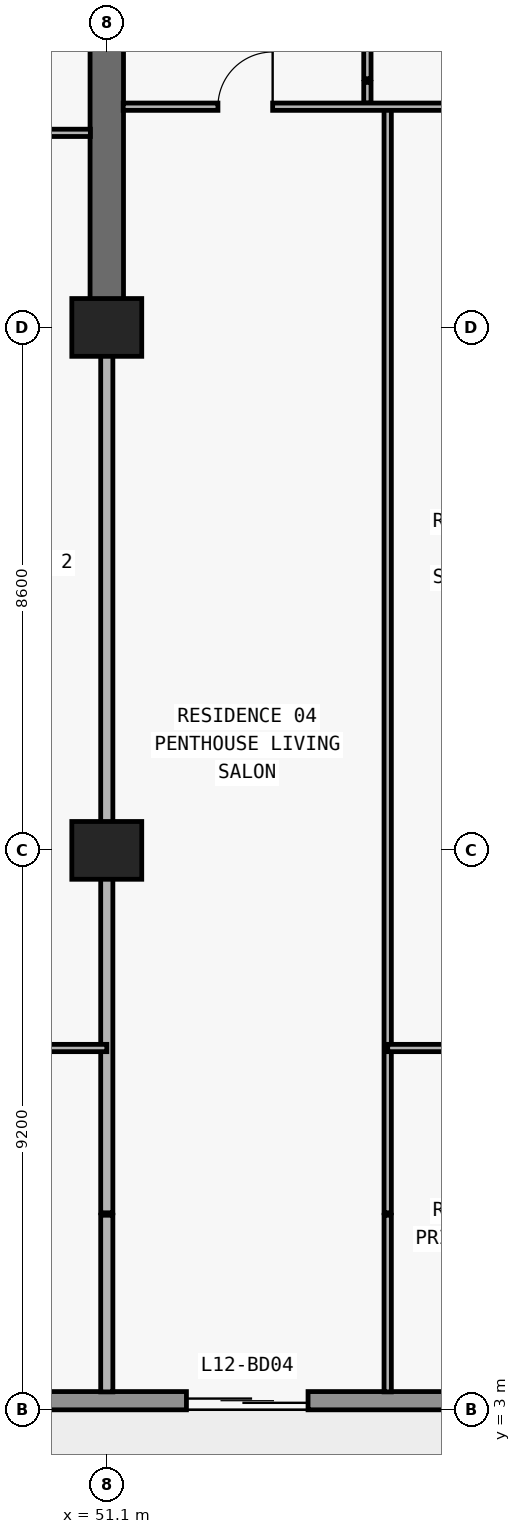
"""IFC4 building model, lengths in metres.
Left out: names, types, materials, properties, quantities, classifications, styles, units other than length and angle.
Written with IfcOpenShell. Run it as: python <this file> out.ifc"""

import sys

from ifc_helpers import new_model, si_unit, direction, frame, frame_2d, origin, origin_2d, place, context, subcontext, project, spatial, rectangle, extrude, element, fill, save


model = new_model("IFC4")
c1 = context("Model", 3, precision=1e-05, world=origin(), true_north=direction((0.0, 1.0)))
c2 = subcontext(c1, "Body", "Model", "MODEL_VIEW")
j1 = project(units=[si_unit("LENGTHUNIT", "METRE"), si_unit("PLANEANGLEUNIT", "RADIAN")], contexts=[c1])
p1 = place(None, origin())
s1 = spatial("IfcSite", under=j1, at=p1, CompositionType="ELEMENT")
p2 = place(p1, origin())
s2 = spatial("IfcBuilding", under=s1, at=p2, CompositionType="ELEMENT")
p3 = place(p2, frame((0.0, 0.0, 49.8)))
s3 = spatial("IfcBuildingStorey", under=s2, at=p3, CompositionType="ELEMENT", Elevation=49.8)
for number, where, z_axis, x_axis in (
    (1, (51.1, 12.2, 0.0), (0.0, 0.0, 1.0), (1.0, 0.0, 0.0)),
    (2, (51.1, 20.8, 0.0), (0.0, 0.0, 1.0), (1.0, 0.0, 0.0)),
):
    element("IfcColumn", number, at=place(p3, frame(where, z_axis=z_axis, x_axis=x_axis)), inside=s3, PredefinedType="COLUMN", context=c2, shape_type="SweptSolid", body=[
        extrude(rectangle(XDim=1.15, YDim=0.95, at=origin_2d()), origin(), (0.0, 0.0, 1.0), 3.05),
    ])
p4 = place(p3, frame((51.1, 20.8, 0.0), z_axis=(0.0, 0.0, 1.0), x_axis=(0.0, 1.0, 0.0)))
e3 = element("IfcWall", 3, at=p4, inside=s3, PredefinedType="SHEAR", context=c2, shape_type="SweptSolid", body=[
    extrude(rectangle(XDim=8.6, YDim=0.55, at=frame_2d((4.3, 0.0))), origin(), (0.0, 0.0, 1.0), 3.05),
])
p5 = place(p3, frame((72.7, 3.15, 0.0), z_axis=(0.0, 0.0, 1.0), x_axis=(-1.0, 0.0, 0.0)))
e4 = element("IfcWall", 4, at=p5, inside=s3, PredefinedType="STANDARD", context=c2, shape_type="SweptSolid", body=[
    extrude(rectangle(XDim=67.6, YDim=0.3, at=frame_2d((33.8, 0.0))), origin(), (0.0, 0.0, 1.0), 3.05),
])
p6 = place(p5, frame((59.826, 0.0, 0.0)))
e5 = element("IfcOpeningElement", 5, at=p6, cuts=e4, PredefinedType="OPENING", context=c2, shape_type="SweptSolid", body=[
    extrude(rectangle(XDim=2.0, YDim=2.3, at=frame_2d((1.0, 1.15))), frame((0.0, 0.16, 0.0), z_axis=(0.0, -1.0, 0.0), x_axis=(1.0, 0.0, 0.0)), (0.0, 0.0, 1.0), 0.32),
])
p7 = place(p5, frame((55.526, 0.0, 0.85)))
e6 = element("IfcOpeningElement", 6, at=p7, cuts=e4, PredefinedType="OPENING", context=c2, shape_type="SweptSolid", body=[
    extrude(rectangle(XDim=2.2, YDim=1.55, at=frame_2d((1.1, 0.775))), frame((0.0, 0.16, 0.0), z_axis=(0.0, -1.0, 0.0), x_axis=(1.0, 0.0, 0.0)), (0.0, 0.0, 1.0), 0.32),
])
p8 = place(p5, frame((51.09, 0.0, 0.0)))
e7 = element("IfcOpeningElement", 7, at=p8, cuts=e4, PredefinedType="OPENING", context=c2, shape_type="SweptSolid", body=[
    extrude(rectangle(XDim=2.0, YDim=2.3, at=frame_2d((1.0, 1.15))), frame((0.0, 0.16, 0.0), z_axis=(0.0, -1.0, 0.0), x_axis=(1.0, 0.0, 0.0)), (0.0, 0.0, 1.0), 0.32),
])
p9 = place(p5, frame((46.99, 0.0, 0.85)))
e8 = element("IfcOpeningElement", 8, at=p9, cuts=e4, PredefinedType="OPENING", context=c2, shape_type="SweptSolid", body=[
    extrude(rectangle(XDim=1.8, YDim=1.55, at=frame_2d((0.9, 0.775))), frame((0.0, 0.16, 0.0), z_axis=(0.0, -1.0, 0.0), x_axis=(1.0, 0.0, 0.0)), (0.0, 0.0, 1.0), 0.32),
])
p10 = place(p5, frame((43.09, 0.0, 0.0)))
e9 = element("IfcOpeningElement", 9, at=p10, cuts=e4, PredefinedType="OPENING", context=c2, shape_type="SweptSolid", body=[
    extrude(rectangle(XDim=2.0, YDim=2.3, at=frame_2d((1.0, 1.15))), frame((0.0, 0.16, 0.0), z_axis=(0.0, -1.0, 0.0), x_axis=(1.0, 0.0, 0.0)), (0.0, 0.0, 1.0), 0.32),
])
p11 = place(p5, frame((38.41, 0.0, 0.65)))
e10 = element("IfcOpeningElement", 10, at=p11, cuts=e4, PredefinedType="OPENING", context=c2, shape_type="SweptSolid", body=[
    extrude(rectangle(XDim=2.6, YDim=1.85, at=frame_2d((1.3, 0.925))), frame((0.0, 0.16, 0.0), z_axis=(0.0, -1.0, 0.0), x_axis=(1.0, 0.0, 0.0)), (0.0, 0.0, 1.0), 0.32),
])
p12 = place(p5, frame((32.7, 0.0, 0.85)))
e11 = element("IfcOpeningElement", 11, at=p12, cuts=e4, PredefinedType="OPENING", context=c2, shape_type="SweptSolid", body=[
    extrude(rectangle(XDim=2.2, YDim=1.55, at=frame_2d((1.1, 0.775))), frame((0.0, 0.16, 0.0), z_axis=(0.0, -1.0, 0.0), x_axis=(1.0, 0.0, 0.0)), (0.0, 0.0, 1.0), 0.32),
])
p13 = place(p5, frame((24.7, 0.0, 0.85)))
e12 = element("IfcOpeningElement", 12, at=p13, cuts=e4, PredefinedType="OPENING", context=c2, shape_type="SweptSolid", body=[
    extrude(rectangle(XDim=2.2, YDim=1.55, at=frame_2d((1.1, 0.775))), frame((0.0, 0.16, 0.0), z_axis=(0.0, -1.0, 0.0), x_axis=(1.0, 0.0, 0.0)), (0.0, 0.0, 1.0), 0.32),
])
p14 = place(p5, frame((18.29, 0.0, 0.0)))
e13 = element("IfcOpeningElement", 13, at=p14, cuts=e4, PredefinedType="OPENING", context=c2, shape_type="SweptSolid", body=[
    extrude(rectangle(XDim=2.0, YDim=2.3, at=frame_2d((1.0, 1.15))), frame((0.0, 0.16, 0.0), z_axis=(0.0, -1.0, 0.0), x_axis=(1.0, 0.0, 0.0)), (0.0, 0.0, 1.0), 0.32),
])
p15 = place(p5, frame((14.19, 0.0, 0.85)))
e14 = element("IfcOpeningElement", 14, at=p15, cuts=e4, PredefinedType="OPENING", context=c2, shape_type="SweptSolid", body=[
    extrude(rectangle(XDim=1.8, YDim=1.55, at=frame_2d((0.9, 0.775))), frame((0.0, 0.16, 0.0), z_axis=(0.0, -1.0, 0.0), x_axis=(1.0, 0.0, 0.0)), (0.0, 0.0, 1.0), 0.32),
])
p16 = place(p5, frame((10.226, 0.0, 0.0)))
e15 = element("IfcOpeningElement", 15, at=p16, cuts=e4, PredefinedType="OPENING", context=c2, shape_type="SweptSolid", body=[
    extrude(rectangle(XDim=2.0, YDim=2.3, at=frame_2d((1.0, 1.15))), frame((0.0, 0.16, 0.0), z_axis=(0.0, -1.0, 0.0), x_axis=(1.0, 0.0, 0.0)), (0.0, 0.0, 1.0), 0.32),
])
p17 = place(p5, frame((5.926, 0.0, 0.85)))
e16 = element("IfcOpeningElement", 16, at=p17, cuts=e4, PredefinedType="OPENING", context=c2, shape_type="SweptSolid", body=[
    extrude(rectangle(XDim=2.2, YDim=1.55, at=frame_2d((1.1, 0.775))), frame((0.0, 0.16, 0.0), z_axis=(0.0, -1.0, 0.0), x_axis=(1.0, 0.0, 0.0)), (0.0, 0.0, 1.0), 0.32),
])
p18 = place(p3, frame((51.1, 3.295, 0.0), z_axis=(0.0, 0.0, 1.0), x_axis=(0.0, 1.0, 0.0)))
e17 = element("IfcWall", 17, at=p18, inside=s3, PredefinedType="PARTITIONING", context=c2, shape_type="SweptSolid", body=[
    extrude(rectangle(XDim=2.905, YDim=0.2, at=frame_2d((1.453, 0.0))), origin(), (0.0, 0.0, 1.0), 3.05),
])
p19 = place(p3, frame((51.1, 6.24, 0.0), z_axis=(0.0, 0.0, 1.0), x_axis=(0.0, 1.0, 0.0)))
e18 = element("IfcWall", 18, at=p19, inside=s3, PredefinedType="PARTITIONING", context=c2, shape_type="SweptSolid", body=[
    extrude(rectangle(XDim=14.555, YDim=0.2, at=frame_2d((7.277, 0.0))), origin(), (0.0, 0.0, 1.0), 2.11),
])
p20 = place(p3, frame((55.386, 24.49, 0.0), z_axis=(0.0, 0.0, 1.0), x_axis=(0.0, 1.0, 0.0)))
e19 = element("IfcWall", 19, at=p20, inside=s3, PredefinedType="PARTITIONING", context=c2, shape_type="SweptSolid", body=[
    extrude(rectangle(XDim=0.34, YDim=0.12, at=frame_2d((0.17, 0.0))), origin(), (0.0, 0.0, 1.0), 3.05),
])
p21 = place(p3, frame((55.386, 24.89, 0.0), z_axis=(0.0, 0.0, 1.0), x_axis=(0.0, 1.0, 0.0)))
e20 = element("IfcWall", 20, at=p21, inside=s3, PredefinedType="PARTITIONING", context=c2, shape_type="SweptSolid", body=[
    extrude(rectangle(XDim=4.69, YDim=0.12, at=frame_2d((2.345, 0.0))), origin(), (0.0, 0.0, 1.0), 3.05),
])
p22 = place(p21, frame((1.895, 0.0, 0.0)))
e21 = element("IfcOpeningElement", 21, at=p22, cuts=e20, PredefinedType="OPENING", context=c2, shape_type="SweptSolid", body=[
    extrude(rectangle(XDim=0.9, YDim=2.15, at=frame_2d((0.45, 1.075))), frame((0.0, 0.07, 0.0), z_axis=(0.0, -1.0, 0.0), x_axis=(1.0, 0.0, 0.0)), (0.0, 0.0, 1.0), 0.14),
])
p23 = place(p3, frame((55.72, 3.295, 0.0), z_axis=(0.0, 0.0, 1.0), x_axis=(0.0, 1.0, 0.0)))
e22 = element("IfcWall", 22, at=p23, inside=s3, PredefinedType="PARTITIONING", context=c2, shape_type="SweptSolid", body=[
    extrude(rectangle(XDim=2.905, YDim=0.12, at=frame_2d((1.453, 0.0))), origin(), (0.0, 0.0, 1.0), 3.05),
])
p24 = place(p3, frame((55.72, 6.24, 0.0), z_axis=(0.0, 0.0, 1.0), x_axis=(0.0, 1.0, 0.0)))
e23 = element("IfcWall", 23, at=p24, inside=s3, PredefinedType="PARTITIONING", context=c2, shape_type="SweptSolid", body=[
    extrude(rectangle(XDim=18.19, YDim=0.12, at=frame_2d((9.095, 0.0))), origin(), (0.0, 0.0, 1.0), 3.05),
])
p25 = place(p3, frame((35.1, 8.95, 0.0), z_axis=(0.0, 0.0, 1.0), x_axis=(1.0, 0.0, 0.0)))
e24 = element("IfcWall", 24, at=p25, inside=s3, PredefinedType="PARTITIONING", context=c2, shape_type="SweptSolid", body=[
    extrude(rectangle(XDim=16.0, YDim=0.12, at=frame_2d((8.0, 0.0))), origin(), (0.0, 0.0, 1.0), 3.05),
])
p26 = place(p25, frame((3.35, 0.0, 0.0)))
e25 = element("IfcOpeningElement", 25, at=p26, cuts=e24, PredefinedType="OPENING", context=c2, shape_type="SweptSolid", body=[
    extrude(rectangle(XDim=0.9, YDim=2.15, at=frame_2d((0.45, 1.075))), frame((0.0, 0.07, 0.0), z_axis=(0.0, -1.0, 0.0), x_axis=(1.0, 0.0, 0.0)), (0.0, 0.0, 1.0), 0.14),
])
p27 = place(p25, frame((11.35, 0.0, 0.0)))
e26 = element("IfcOpeningElement", 26, at=p27, cuts=e24, PredefinedType="OPENING", context=c2, shape_type="SweptSolid", body=[
    extrude(rectangle(XDim=0.9, YDim=2.15, at=frame_2d((0.45, 1.075))), frame((0.0, 0.07, 0.0), z_axis=(0.0, -1.0, 0.0), x_axis=(1.0, 0.0, 0.0)), (0.0, 0.0, 1.0), 0.14),
])
p28 = place(p3, frame((55.72, 8.95, 0.0), z_axis=(0.0, 0.0, 1.0), x_axis=(1.0, 0.0, 0.0)))
e27 = element("IfcWall", 27, at=p28, inside=s3, PredefinedType="PARTITIONING", context=c2, shape_type="SweptSolid", body=[
    extrude(rectangle(XDim=3.78, YDim=0.12, at=frame_2d((1.89, 0.0))), origin(), (0.0, 0.0, 1.0), 3.05),
])
p29 = place(p28, frame((1.44, 0.0, 0.0)))
e28 = element("IfcOpeningElement", 28, at=p29, cuts=e27, PredefinedType="OPENING", context=c2, shape_type="SweptSolid", body=[
    extrude(rectangle(XDim=0.9, YDim=2.15, at=frame_2d((0.45, 1.075))), frame((0.0, 0.07, 0.0), z_axis=(0.0, -1.0, 0.0), x_axis=(1.0, 0.0, 0.0)), (0.0, 0.0, 1.0), 0.14),
])
p30 = place(p3, frame((42.7, 24.0, 0.0), z_axis=(0.0, 0.0, 1.0), x_axis=(1.0, 0.0, 0.0)))
e29 = element("IfcWall", 29, at=p30, inside=s3, PredefinedType="PARTITIONING", context=c2, shape_type="SweptSolid", body=[
    extrude(rectangle(XDim=8.13, YDim=0.12, at=frame_2d((4.065, 0.0))), origin(), (0.0, 0.0, 1.0), 3.05),
])
p31 = place(p30, frame((3.615, 0.0, 0.0)))
e30 = element("IfcOpeningElement", 30, at=p31, cuts=e29, PredefinedType="OPENING", context=c2, shape_type="SweptSolid", body=[
    extrude(rectangle(XDim=0.9, YDim=2.15, at=frame_2d((0.45, 1.075))), frame((0.0, 0.07, 0.0), z_axis=(0.0, -1.0, 0.0), x_axis=(1.0, 0.0, 0.0)), (0.0, 0.0, 1.0), 0.14),
])
p32 = place(p3, frame((51.37, 24.43, 0.0), z_axis=(0.0, 0.0, 1.0), x_axis=(1.0, 0.0, 0.0)))
e31 = element("IfcWall", 31, at=p32, inside=s3, PredefinedType="PARTITIONING", context=c2, shape_type="SweptSolid", body=[
    extrude(rectangle(XDim=8.13, YDim=0.12, at=frame_2d((4.065, 0.0))), origin(), (0.0, 0.0, 1.0), 3.05),
])
p33 = place(p32, frame((1.558, 0.0, 0.0)))
e32 = element("IfcOpeningElement", 32, at=p33, cuts=e31, PredefinedType="OPENING", context=c2, shape_type="SweptSolid", body=[
    extrude(rectangle(XDim=0.9, YDim=2.15, at=frame_2d((0.45, 1.075))), frame((0.0, 0.07, 0.0), z_axis=(0.0, -1.0, 0.0), x_axis=(1.0, 0.0, 0.0)), (0.0, 0.0, 1.0), 0.14),
])
p34 = place(p32, frame((5.79, 0.0, 0.0)))
e33 = element("IfcOpeningElement", 33, at=p34, cuts=e31, PredefinedType="OPENING", context=c2, shape_type="SweptSolid", body=[
    extrude(rectangle(XDim=0.9, YDim=2.15, at=frame_2d((0.45, 1.075))), frame((0.0, 0.07, 0.0), z_axis=(0.0, -1.0, 0.0), x_axis=(1.0, 0.0, 0.0)), (0.0, 0.0, 1.0), 0.14),
])
p35 = place(p14, origin())
e34 = element("IfcDoor", 34, at=p35, inside=s3, OperationType="DOUBLE_DOOR_SLIDING", PredefinedType="DOOR", context=c2, shape_type="SweptSolid", body=[
    extrude(rectangle(XDim=2.0, YDim=2.3, at=frame_2d((1.0, 1.15))), frame((0.0, 0.025, 0.0), z_axis=(0.0, -1.0, 0.0), x_axis=(1.0, 0.0, 0.0)), (0.0, 0.0, 1.0), 0.05),
])
fill(e13, e34)
p36 = place(p33, origin())
e35 = element("IfcDoor", 35, at=p36, inside=s3, OperationType="SINGLE_SWING_RIGHT", PredefinedType="DOOR", context=c2, shape_type="SweptSolid", body=[
    extrude(rectangle(XDim=0.9, YDim=2.15, at=frame_2d((0.45, 1.075))), frame((0.0, 0.025, 0.0), z_axis=(0.0, -1.0, 0.0), x_axis=(1.0, 0.0, 0.0)), (0.0, 0.0, 1.0), 0.05),
])
fill(e32, e35)
save(model, sys.argv[1])
